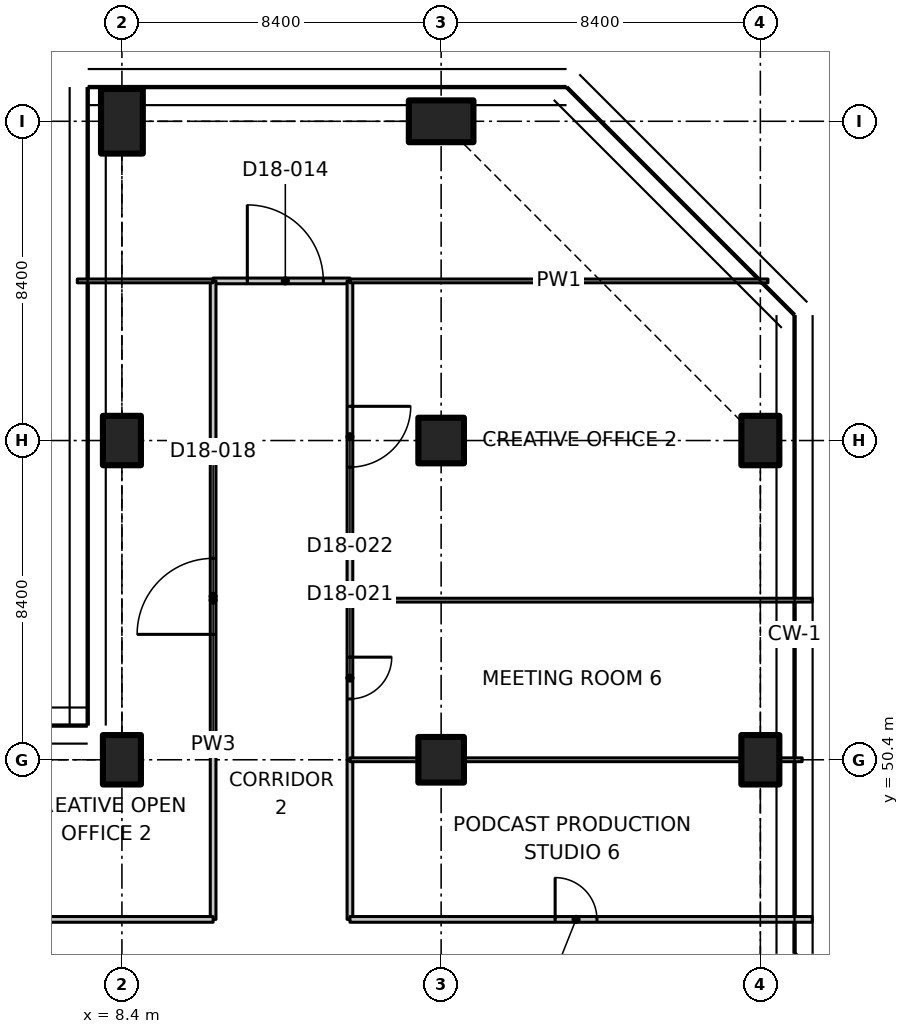
"""IFC4 building model, lengths in metres.
Left out: names, types, materials, properties, quantities, classifications, styles, units other than length and angle.
Written with IfcOpenShell. Run it as: python <this file> out.ifc"""

import sys

from ifc_helpers import new_model, si_unit, direction, frame, frame_2d, origin, origin_2d, place, context, subcontext, project, spatial, polyline, rectangle, outline, extrude, element, fill, save


model = new_model("IFC4")
c1 = context("Model", 3, precision=1e-05, world=origin(), true_north=direction((0.0, 1.0)))
c2 = subcontext(c1, "Body", "Model", "MODEL_VIEW")
j1 = project(units=[si_unit("LENGTHUNIT", "METRE"), si_unit("PLANEANGLEUNIT", "RADIAN")], contexts=[c1])
p1 = place(None, origin())
s1 = spatial("IfcSite", under=j1, at=p1, CompositionType="ELEMENT")
p2 = place(p1, origin())
s2 = spatial("IfcBuilding", under=s1, at=p2, CompositionType="ELEMENT")
p3 = place(p2, frame((0.0, 0.0, 149.3)))
s3 = spatial("IfcBuildingStorey", under=s2, at=p3, CompositionType="ELEMENT", Elevation=149.3)
for number, where, z_axis, x_axis in (
    (1, (8.4, 50.4, 0.0), (0.0, 0.0, 1.0), (1.0, 0.0, 0.0)),
    (2, (8.4, 58.8, 0.0), (0.0, 0.0, 1.0), (1.0, 0.0, 0.0)),
):
    element("IfcColumn", number, at=place(p3, frame(where, z_axis=z_axis, x_axis=x_axis)), inside=s3, PredefinedType="COLUMN", context=c2, shape_type="SweptSolid", body=[
        extrude(rectangle(XDim=1.0, YDim=1.3, at=origin_2d()), origin(), (0.0, 0.0, 1.0), 3.35),
    ])
p4 = place(p3, frame((8.4, 67.2, 0.0), z_axis=(0.0, 0.0, 1.0), x_axis=(1.0, 0.0, 0.0)))
e3 = element("IfcColumn", 3, at=p4, inside=s3, PredefinedType="COLUMN", context=c2, shape_type="SweptSolid", body=[
    extrude(rectangle(XDim=1.1, YDim=1.7, at=origin_2d()), origin(), (0.0, 0.0, 1.0), 3.35),
])
for number, where, z_axis, x_axis in (
    (4, (16.8, 50.4, 0.0), (0.0, 0.0, 1.0), (1.0, 0.0, 0.0)),
    (5, (16.8, 58.8, 0.0), (0.0, 0.0, 1.0), (1.0, 0.0, 0.0)),
):
    element("IfcColumn", number, at=place(p3, frame(where, z_axis=z_axis, x_axis=x_axis)), inside=s3, PredefinedType="COLUMN", context=c2, shape_type="SweptSolid", body=[
        extrude(rectangle(XDim=1.2, YDim=1.2, at=origin_2d()), origin(), (0.0, 0.0, 1.0), 3.35),
    ])
p5 = place(p3, frame((16.8, 67.2, 0.0), z_axis=(0.0, 0.0, 1.0), x_axis=(0.0, 1.0, 0.0)))
e6 = element("IfcColumn", 6, at=p5, inside=s3, PredefinedType="COLUMN", context=c2, shape_type="SweptSolid", body=[
    extrude(rectangle(XDim=1.1, YDim=1.7, at=origin_2d()), origin(), (0.0, 0.0, 1.0), 3.35),
])
for number, where, z_axis, x_axis in (
    (7, (25.2, 50.4, 0.0), (0.0, 0.0, 1.0), (1.0, 0.0, 0.0)),
    (8, (25.2, 58.8, 0.0), (0.0, 0.0, 1.0), (1.0, 0.0, 0.0)),
):
    element("IfcColumn", number, at=place(p3, frame(where, z_axis=z_axis, x_axis=x_axis)), inside=s3, PredefinedType="COLUMN", context=c2, shape_type="SweptSolid", body=[
        extrude(rectangle(XDim=1.0, YDim=1.3, at=origin_2d()), origin(), (0.0, 0.0, 1.0), 3.35),
    ])
p6 = place(p3, frame((10.8, 63.0, 0.0), z_axis=(0.0, 0.0, 1.0), x_axis=(1.0, 0.0, 0.0)))
e9 = element("IfcWall", 9, at=p6, inside=s3, PredefinedType="PARTITIONING", context=c2, shape_type="SweptSolid", body=[
    extrude(rectangle(XDim=3.6, YDim=0.15, at=frame_2d((1.8, 0.0))), origin(), (0.0, 0.0, 1.0), 3.33),
])
p7 = place(p6, frame((0.9, 0.0, 0.0)))
e10 = element("IfcOpeningElement", 10, at=p7, cuts=e9, PredefinedType="OPENING", context=c2, shape_type="SweptSolid", body=[
    extrude(rectangle(XDim=2.0, YDim=2.4, at=frame_2d((1.0, 1.2))), frame((0.0, 0.085, 0.0), z_axis=(0.0, -1.0, 0.0), x_axis=(1.0, 0.0, 0.0)), (0.0, 0.0, 1.0), 0.17),
])
p8 = place(p3, frame((10.8, 46.2, 0.0), z_axis=(0.0, 0.0, 1.0), x_axis=(0.0, 1.0, 0.0)))
e11 = element("IfcWall", 11, at=p8, inside=s3, PredefinedType="PARTITIONING", context=c2, shape_type="SweptSolid", body=[
    extrude(rectangle(XDim=16.8, YDim=0.15, at=frame_2d((8.4, 0.0))), origin(), (0.0, 0.0, 1.0), 3.33),
])
p9 = place(p8, frame((7.5, 0.0, 0.0)))
e12 = element("IfcOpeningElement", 12, at=p9, cuts=e11, PredefinedType="OPENING", context=c2, shape_type="SweptSolid", body=[
    extrude(rectangle(XDim=2.0, YDim=2.4, at=frame_2d((1.0, 1.2))), frame((0.0, 0.085, 0.0), z_axis=(0.0, -1.0, 0.0), x_axis=(1.0, 0.0, 0.0)), (0.0, 0.0, 1.0), 0.17),
])
p10 = place(p3, frame((14.4, 50.4, 0.0), z_axis=(0.0, 0.0, 1.0), x_axis=(0.0, -1.0, 0.0)))
e13 = element("IfcWall", 13, at=p10, inside=s3, PredefinedType="PARTITIONING", context=c2, shape_type="SweptSolid", body=[
    extrude(rectangle(XDim=4.2, YDim=0.15, at=frame_2d((2.1, 0.0))), origin(), (0.0, 0.0, 1.0), 3.33),
])
p11 = place(p3, frame((14.4, 54.6, 0.0), z_axis=(0.0, 0.0, 1.0), x_axis=(0.0, -1.0, 0.0)))
e14 = element("IfcWall", 14, at=p11, inside=s3, PredefinedType="PARTITIONING", context=c2, shape_type="SweptSolid", body=[
    extrude(rectangle(XDim=4.2, YDim=0.15, at=frame_2d((2.1, 0.0))), origin(), (0.0, 0.0, 1.0), 3.33),
])
p12 = place(p11, frame((1.5, 0.0, 0.0)))
e15 = element("IfcOpeningElement", 15, at=p12, cuts=e14, PredefinedType="OPENING", context=c2, shape_type="SweptSolid", body=[
    extrude(rectangle(XDim=1.1, YDim=2.1, at=frame_2d((0.55, 1.05))), frame((0.0, 0.085, 0.0), z_axis=(0.0, -1.0, 0.0), x_axis=(1.0, 0.0, 0.0)), (0.0, 0.0, 1.0), 0.17),
])
p13 = place(p3, frame((14.4, 63.0, 0.0), z_axis=(0.0, 0.0, 1.0), x_axis=(0.0, -1.0, 0.0)))
e16 = element("IfcWall", 16, at=p13, inside=s3, PredefinedType="PARTITIONING", context=c2, shape_type="SweptSolid", body=[
    extrude(rectangle(XDim=8.4, YDim=0.15, at=frame_2d((4.2, 0.0))), origin(), (0.0, 0.0, 1.0), 3.33),
])
p14 = place(p13, frame((3.3, 0.0, 0.0)))
e17 = element("IfcOpeningElement", 17, at=p14, cuts=e16, PredefinedType="OPENING", context=c2, shape_type="SweptSolid", body=[
    extrude(rectangle(XDim=1.6, YDim=2.1, at=frame_2d((0.8, 1.05))), frame((0.0, 0.085, 0.0), z_axis=(0.0, -1.0, 0.0), x_axis=(1.0, 0.0, 0.0)), (0.0, 0.0, 1.0), 0.17),
])
p15 = place(p3, frame((10.8, 63.0, 0.0), z_axis=(0.0, 0.0, 1.0), x_axis=(-1.0, 0.0, 0.0)))
e18 = element("IfcWall", 18, at=p15, inside=s3, PredefinedType="PARTITIONING", context=c2, shape_type="SweptSolid", body=[
    extrude(rectangle(XDim=3.574, YDim=0.1, at=frame_2d((1.787, 0.0))), origin(), (0.0, 0.0, 1.0), 2.98),
])
p16 = place(p3, frame((25.4, 63.0, 0.0), z_axis=(0.0, 0.0, 1.0), x_axis=(-1.0, 0.0, 0.0)))
e19 = element("IfcWall", 19, at=p16, inside=s3, PredefinedType="PARTITIONING", context=c2, shape_type="SweptSolid", body=[
    extrude(outline(polyline([(0.0, 0.0), (11.0, 0.0), (11.0, 3.33), (5.066, 3.33), (5.064, 2.98), (3.736, 2.98), (3.734, 3.33), (0.0, 3.33), (0.0, 0.0)])), frame((0.0, 0.05, 0.0), z_axis=(0.0, -1.0, 0.0), x_axis=(1.0, 0.0, 0.0)), (0.0, 0.0, 1.0), 0.1),
])
p17 = place(p3, frame((4.426, 46.2, 0.0), z_axis=(0.0, 0.0, 1.0), x_axis=(1.0, 0.0, 0.0)))
e20 = element("IfcWall", 20, at=p17, inside=s3, PredefinedType="PARTITIONING", context=c2, shape_type="SweptSolid", body=[
    extrude(outline(polyline([(0.0, 0.0), (6.374, 0.0), (6.374, 3.33), (1.624, 3.33), (1.622, 2.98), (0.726, 2.98), (0.724, 3.33), (0.074, 3.33), (0.0, 3.33), (0.0, 0.0)])), frame((0.0, 0.075, 0.0), z_axis=(0.0, -1.0, 0.0), x_axis=(1.0, 0.0, 0.0)), (0.0, 0.0, 1.0), 0.15),
])
p18 = place(p3, frame((14.4, 46.2, 0.0), z_axis=(0.0, 0.0, 1.0), x_axis=(1.0, 0.0, 0.0)))
e21 = element("IfcWall", 21, at=p18, inside=s3, PredefinedType="PARTITIONING", context=c2, shape_type="SweptSolid", body=[
    extrude(outline(polyline([(0.0, 0.0), (12.165, 0.0), (12.165, 3.33), (11.9, 3.33), (11.25, 3.33), (11.248, 2.98), (10.352, 2.98), (10.35, 3.33), (0.0, 3.33), (0.0, 0.0)])), frame((0.0, 0.075, 0.0), z_axis=(0.0, -1.0, 0.0), x_axis=(1.0, 0.0, 0.0)), (0.0, 0.0, 1.0), 0.15),
])
p19 = place(p18, frame((5.4, 0.0, 0.0)))
e22 = element("IfcOpeningElement", 22, at=p19, cuts=e21, PredefinedType="OPENING", context=c2, shape_type="SweptSolid", body=[
    extrude(rectangle(XDim=1.1, YDim=2.1, at=frame_2d((0.55, 1.05))), frame((0.0, 0.085, 0.0), z_axis=(0.0, -1.0, 0.0), x_axis=(1.0, 0.0, 0.0)), (0.0, 0.0, 1.0), 0.17),
])
p20 = place(p3, frame((14.4, 50.4, 0.0), z_axis=(0.0, 0.0, 1.0), x_axis=(1.0, 0.0, 0.0)))
e23 = element("IfcWall", 23, at=p20, inside=s3, PredefinedType="PARTITIONING", context=c2, shape_type="SweptSolid", body=[
    extrude(rectangle(XDim=1.78, YDim=0.1, at=frame_2d((0.89, 0.0))), origin(), (0.0, 0.0, 1.0), 3.33),
])
p21 = place(p3, frame((17.42, 50.4, 0.0), z_axis=(0.0, 0.0, 1.0), x_axis=(1.0, 0.0, 0.0)))
e24 = element("IfcWall", 24, at=p21, inside=s3, PredefinedType="PARTITIONING", context=c2, shape_type="SweptSolid", body=[
    extrude(rectangle(XDim=7.26, YDim=0.1, at=frame_2d((3.63, 0.0))), origin(), (0.0, 0.0, 1.0), 3.33),
])
p22 = place(p3, frame((25.72, 50.4, 0.0), z_axis=(0.0, 0.0, 1.0), x_axis=(1.0, 0.0, 0.0)))
e25 = element("IfcWall", 25, at=p22, inside=s3, PredefinedType="PARTITIONING", context=c2, shape_type="SweptSolid", body=[
    extrude(rectangle(XDim=0.58, YDim=0.1, at=frame_2d((0.29, 0.0))), origin(), (0.0, 0.0, 1.0), 3.33),
])
p23 = place(p3, frame((14.4, 54.6, 0.0), z_axis=(0.0, 0.0, 1.0), x_axis=(1.0, 0.0, 0.0)))
e26 = element("IfcWall", 26, at=p23, inside=s3, PredefinedType="PARTITIONING", context=c2, shape_type="SweptSolid", body=[
    extrude(outline(polyline([(0.0, 0.0), (12.165, 0.0), (12.165, 3.33), (11.9, 3.33), (11.25, 3.33), (11.248, 2.98), (10.352, 2.98), (10.35, 3.33), (0.0, 3.33), (0.0, 0.0)])), frame((0.0, 0.05, 0.0), z_axis=(0.0, -1.0, 0.0), x_axis=(1.0, 0.0, 0.0)), (0.0, 0.0, 1.0), 0.1),
])
p24 = place(p7, origin())
e27 = element("IfcDoor", 27, at=p24, inside=s3, OperationType="DOUBLE_DOOR_SINGLE_SWING", PredefinedType="DOOR", context=c2, shape_type="SweptSolid", body=[
    extrude(rectangle(XDim=2.0, YDim=2.4, at=frame_2d((1.0, 1.2))), frame((0.0, 0.025, 0.0), z_axis=(0.0, -1.0, 0.0), x_axis=(1.0, 0.0, 0.0)), (0.0, 0.0, 1.0), 0.05),
])
fill(e10, e27)
p25 = place(p9, origin())
e28 = element("IfcDoor", 28, at=p25, inside=s3, OperationType="DOUBLE_DOOR_SINGLE_SWING", PredefinedType="DOOR", context=c2, shape_type="SweptSolid", body=[
    extrude(rectangle(XDim=2.0, YDim=2.4, at=frame_2d((1.0, 1.2))), frame((0.0, 0.025, 0.0), z_axis=(0.0, -1.0, 0.0), x_axis=(1.0, 0.0, 0.0)), (0.0, 0.0, 1.0), 0.05),
])
fill(e12, e28)
p26 = place(p19, origin())
e29 = element("IfcDoor", 29, at=p26, inside=s3, OperationType="SINGLE_SWING_LEFT", PredefinedType="DOOR", context=c2, shape_type="SweptSolid", body=[
    extrude(rectangle(XDim=1.1, YDim=2.1, at=frame_2d((0.55, 1.05))), frame((0.0, 0.025, 0.0), z_axis=(0.0, -1.0, 0.0), x_axis=(1.0, 0.0, 0.0)), (0.0, 0.0, 1.0), 0.05),
])
fill(e22, e29)
p27 = place(p12, origin())
e30 = element("IfcDoor", 30, at=p27, inside=s3, OperationType="SINGLE_SWING_LEFT", PredefinedType="DOOR", context=c2, shape_type="SweptSolid", body=[
    extrude(rectangle(XDim=1.1, YDim=2.1, at=frame_2d((0.55, 1.05))), frame((0.0, 0.025, 0.0), z_axis=(0.0, -1.0, 0.0), x_axis=(1.0, 0.0, 0.0)), (0.0, 0.0, 1.0), 0.05),
])
fill(e15, e30)
p28 = place(p14, origin())
e31 = element("IfcDoor", 31, at=p28, inside=s3, OperationType="DOUBLE_DOOR_SINGLE_SWING", PredefinedType="DOOR", context=c2, shape_type="SweptSolid", body=[
    extrude(rectangle(XDim=1.6, YDim=2.1, at=frame_2d((0.8, 1.05))), frame((0.0, 0.025, 0.0), z_axis=(0.0, -1.0, 0.0), x_axis=(1.0, 0.0, 0.0)), (0.0, 0.0, 1.0), 0.05),
])
fill(e17, e31)
save(model, sys.argv[1])
